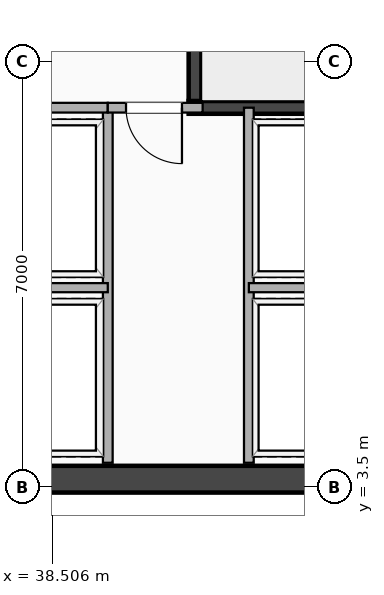
"""IFC4 building model, lengths in metres.
Left out: names, types, materials, properties, quantities, classifications, styles, units other than length and angle.
Written with IfcOpenShell. Run it as: python <this file> out.ifc"""

import sys

from ifc_helpers import new_model, si_unit, direction, frame, frame_2d, origin, place, context, subcontext, project, spatial, rectangle, extrude, element, fill, save


model = new_model("IFC4")
c1 = context("Model", 3, precision=1e-05, world=origin(), true_north=direction((0.0, 1.0)))
c2 = subcontext(c1, "Body", "Model", "MODEL_VIEW")
j1 = project(units=[si_unit("LENGTHUNIT", "METRE"), si_unit("PLANEANGLEUNIT", "RADIAN")], contexts=[c1])
p1 = place(None, origin())
s1 = spatial("IfcSite", under=j1, at=p1, CompositionType="ELEMENT")
p2 = place(p1, origin())
s2 = spatial("IfcBuilding", under=s1, at=p2, CompositionType="ELEMENT")
p3 = place(p2, frame((0.0, 0.0, 68.4)))
s3 = spatial("IfcBuildingStorey", under=s2, at=p3, CompositionType="ELEMENT", Elevation=68.4)
p4 = place(p3, frame((20.3, 3.63, 0.0), z_axis=(0.0, 0.0, 1.0), x_axis=(1.0, 0.0, 0.0)))
e1 = element("IfcWall", 1, at=p4, inside=s3, PredefinedType="SHEAR", context=c2, shape_type="SweptSolid", body=[
    extrude(rectangle(XDim=24.5, YDim=0.44, at=frame_2d((12.25, 0.0))), origin(), (0.0, 0.0, 1.0), 3.22),
])
p5 = place(p3, frame((40.855, 9.745, 0.0), z_axis=(0.0, 0.0, 1.0), x_axis=(0.0, 1.0, 0.0)))
e2 = element("IfcWall", 2, at=p5, inside=s3, PredefinedType="SHEAR", context=c2, shape_type="SweptSolid", body=[
    extrude(rectangle(XDim=8.01, YDim=0.21, at=frame_2d((4.005, 0.0))), origin(), (0.0, 0.0, 1.0), 3.22),
])
p6 = place(p3, frame((40.75, 9.745, 0.0), z_axis=(0.0, 0.0, 1.0), x_axis=(1.0, 0.0, 0.0)))
e3 = element("IfcWall", 3, at=p6, inside=s3, PredefinedType="SHEAR", context=c2, shape_type="SweptSolid", body=[
    extrude(rectangle(XDim=3.66, YDim=0.21, at=frame_2d((1.83, 0.0))), origin(), (0.0, 0.0, 1.0), 3.22),
])
for number, where, z_axis, x_axis in (
    (4, (39.42, 3.9, 0.0), (0.0, 0.0, 1.0), (0.0, 1.0, 0.0)),
    (5, (41.74, 3.9, 0.0), (0.0, 0.0, 1.0), (0.0, 1.0, 0.0)),
):
    element("IfcWall", number, at=place(p3, frame(where, z_axis=z_axis, x_axis=x_axis)), inside=s3, PredefinedType="PARTITIONING", context=c2, shape_type="SweptSolid", body=[
        extrude(rectangle(XDim=5.84, YDim=0.16, at=frame_2d((2.92, 0.0))), origin(), (0.0, 0.0, 1.0), 3.22),
    ])
p7 = place(p3, frame((37.25, 6.78, 0.0), z_axis=(0.0, 0.0, 1.0), x_axis=(1.0, 0.0, 0.0)))
e6 = element("IfcWall", 6, at=p7, inside=s3, PredefinedType="PARTITIONING", context=c2, shape_type="SweptSolid", body=[
    extrude(rectangle(XDim=2.17, YDim=0.15, at=frame_2d((1.085, 0.0))), origin(), (0.0, 0.0, 1.0), 3.22),
])
p8 = place(p3, frame((41.74, 6.78, 0.0), z_axis=(0.0, 0.0, 1.0), x_axis=(1.0, 0.0, 0.0)))
e7 = element("IfcWall", 7, at=p8, inside=s3, PredefinedType="PARTITIONING", context=c2, shape_type="SweptSolid", body=[
    extrude(rectangle(XDim=2.66, YDim=0.15, at=frame_2d((1.33, 0.0))), origin(), (0.0, 0.0, 1.0), 2.51),
])
p9 = place(p3, frame((37.25, 9.74, 0.0), z_axis=(0.0, 0.0, 1.0), x_axis=(1.0, 0.0, 0.0)))
e8 = element("IfcWall", 8, at=p9, inside=s3, PredefinedType="PARTITIONING", context=c2, shape_type="SweptSolid", body=[
    extrude(rectangle(XDim=2.17, YDim=0.16, at=frame_2d((1.085, 0.0))), origin(), (0.0, 0.0, 1.0), 3.22),
])
p10 = place(p3, frame((39.42, 9.74, 0.0), z_axis=(0.0, 0.0, 1.0), x_axis=(1.0, 0.0, 0.0)))
e9 = element("IfcWall", 9, at=p10, inside=s3, PredefinedType="PARTITIONING", context=c2, shape_type="SweptSolid", body=[
    extrude(rectangle(XDim=1.56, YDim=0.16, at=frame_2d((0.78, 0.0))), origin(), (0.0, 0.0, 1.0), 3.22),
])
p11 = place(p10, frame((0.3, 0.0, 0.0)))
e10 = element("IfcOpeningElement", 10, at=p11, cuts=e9, PredefinedType="OPENING", context=c2, shape_type="SweptSolid", body=[
    extrude(rectangle(XDim=0.92, YDim=2.08, at=frame_2d((0.46, 1.04))), frame((0.0, 0.09, 0.0), z_axis=(0.0, -1.0, 0.0), x_axis=(1.0, 0.0, 0.0)), (0.0, 0.0, 1.0), 0.18),
])
p12 = place(p11, origin())
e11 = element("IfcDoor", 11, at=p12, inside=s3, OperationType="SINGLE_SWING_RIGHT", PredefinedType="DOOR", context=c2, shape_type="SweptSolid", body=[
    extrude(rectangle(XDim=0.92, YDim=2.08, at=frame_2d((0.46, 1.04))), frame((0.0, 0.025, 0.0), z_axis=(0.0, -1.0, 0.0), x_axis=(1.0, 0.0, 0.0)), (0.0, 0.0, 1.0), 0.05),
])
fill(e10, e11)
save(model, sys.argv[1])
